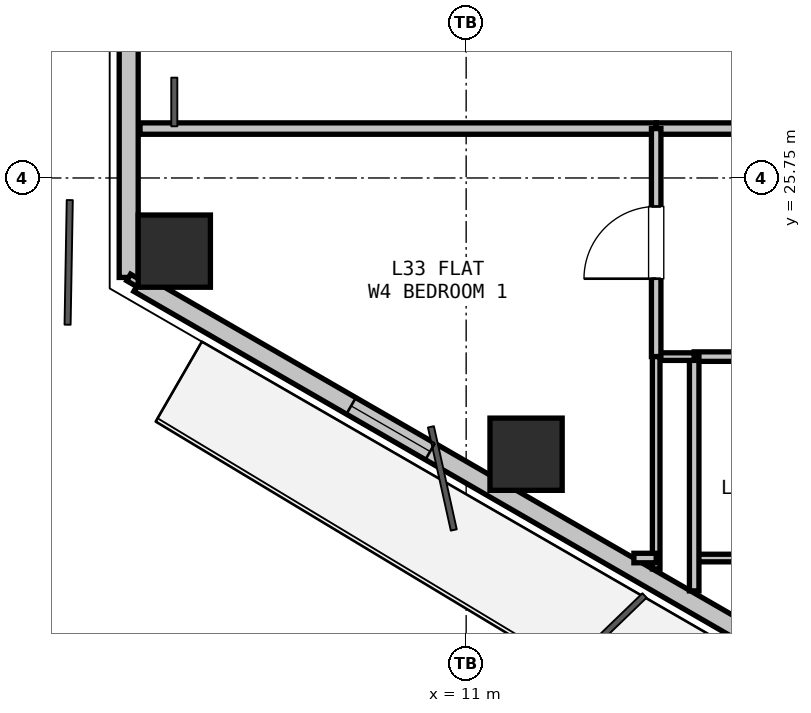
"""IFC4 building model, lengths in metres.
Left out: names, types, materials, properties, quantities, classifications, styles, units other than length and angle.
Written with IfcOpenShell. Run it as: python <this file> out.ifc"""

import sys

from ifc_helpers import new_model, si_unit, direction, frame, frame_2d, origin, origin_2d, place, context, subcontext, project, spatial, rectangle, hollow_rectangle, extrude, element, fill, save


model = new_model("IFC4")
c1 = context("Model", 3, precision=1e-05, world=origin(), true_north=direction((0.0, 1.0)))
c2 = subcontext(c1, "Body", "Model", "MODEL_VIEW")
j1 = project(units=[si_unit("LENGTHUNIT", "METRE"), si_unit("PLANEANGLEUNIT", "RADIAN")], contexts=[c1])
p1 = place(None, origin())
s1 = spatial("IfcSite", under=j1, at=p1, CompositionType="ELEMENT")
p2 = place(p1, origin())
s2 = spatial("IfcBuilding", under=s1, at=p2, CompositionType="ELEMENT")
p3 = place(p2, frame((0.0, 0.0, 121.2)))
s3 = spatial("IfcBuildingStorey", under=s2, at=p3, CompositionType="ELEMENT", Elevation=121.2)
for number, where, z_axis, x_axis in (
    (1, (11.788, 22.116, -0.24), (0.0, 0.0, 1.0), (1.0, 0.0, 0.0)),
    (2, (7.16, 24.788, -0.24), (0.0, 0.0, 1.0), (1.0, 0.0, 0.0)),
):
    element("IfcColumn", number, at=place(p3, frame(where, z_axis=z_axis, x_axis=x_axis)), inside=s3, PredefinedType="COLUMN", context=c2, shape_type="SweptSolid", body=[
        extrude(hollow_rectangle(XDim=0.95, YDim=0.95, WallThickness=0.028, at=origin_2d()), origin(), (0.0, 0.0, 1.0), 3.54),
    ])
p4 = place(p3, frame((6.56, 24.441, 0.0), z_axis=(0.0, 0.0, 1.0), x_axis=(0.0, 1.0, 0.0)))
e3 = element("IfcWall", 3, at=p4, inside=s3, PredefinedType="SOLIDWALL", context=c2, shape_type="SweptSolid", body=[
    extrude(rectangle(XDim=4.617, YDim=0.25, at=frame_2d((2.309, 0.0))), origin(), (0.0, 0.0, 1.0), 2.68),
])
p5 = place(p3, frame((16.378, 18.773, 0.0), z_axis=(0.0, 0.0, 1.0), x_axis=(-0.866027848477, 0.499995765644, 0.0)))
e4 = element("IfcWall", 4, at=p5, inside=s3, PredefinedType="SOLIDWALL", context=c2, shape_type="SweptSolid", body=[
    extrude(rectangle(XDim=11.186, YDim=0.25, at=frame_2d((5.593, 0.0))), origin(), (0.0, 0.0, 1.0), 2.68),
])
p6 = place(p5, frame((6.757, 0.0, 0.9)))
e5 = element("IfcOpeningElement", 5, at=p6, cuts=e4, PredefinedType="OPENING", context=c2, shape_type="SweptSolid", body=[
    extrude(rectangle(XDim=1.2, YDim=1.4, at=frame_2d((0.6, 0.7))), frame((0.0, 0.135, 0.0), z_axis=(0.0, -1.0, 0.0), x_axis=(1.0, 0.0, 0.0)), (0.0, 0.0, 1.0), 0.27),
])
p7 = place(p3, frame((14.0, 23.4, 0.0), z_axis=(0.0, 0.0, 1.0), x_axis=(1.0, 0.0, 0.0)))
e6 = element("IfcWall", 6, at=p7, inside=s3, PredefinedType="PARTITIONING", context=c2, shape_type="SweptSolid", body=[
    extrude(rectangle(XDim=3.0, YDim=0.125, at=frame_2d((1.5, 0.0))), origin(), (0.0, 0.0, 1.0), 3.06),
])
p8 = place(p7, frame((1.025, 0.0, 0.0)))
e7 = element("IfcOpeningElement", 7, at=p8, cuts=e6, PredefinedType="OPENING", context=c2, shape_type="SweptSolid", body=[
    extrude(rectangle(XDim=0.95, YDim=2.1, at=frame_2d((0.475, 1.05))), frame((0.0, 0.073, 0.0), z_axis=(0.0, -1.0, 0.0), x_axis=(1.0, 0.0, 0.0)), (0.0, 0.0, 1.0), 0.145),
])
p9 = place(p3, frame((17.0, 20.75, 0.0), z_axis=(0.0, 0.0, 1.0), x_axis=(-1.0, 0.0, 0.0)))
e8 = element("IfcWall", 8, at=p9, inside=s3, PredefinedType="PARTITIONING", context=c2, shape_type="SweptSolid", body=[
    extrude(rectangle(XDim=3.0, YDim=0.1, at=frame_2d((1.5, 0.0))), origin(), (0.0, 0.0, 1.0), 2.365),
])
p10 = place(p3, frame((14.0, 20.318, 0.0), z_axis=(0.0, 0.0, 1.0), x_axis=(0.0, 1.0, 0.0)))
e9 = element("IfcWall", 9, at=p10, inside=s3, PredefinedType="PARTITIONING", context=c2, shape_type="SweptSolid", body=[
    extrude(rectangle(XDim=3.082, YDim=0.125, at=frame_2d((1.541, 0.0))), origin(), (0.0, 0.0, 1.0), 2.365),
])
p11 = place(p3, frame((21.95, 26.4, 0.0), z_axis=(0.0, 0.0, 1.0), x_axis=(-1.0, 0.0, 0.0)))
e10 = element("IfcWall", 10, at=p11, inside=s3, PredefinedType="PARTITIONING", context=c2, shape_type="SweptSolid", body=[
    extrude(rectangle(XDim=8.45, YDim=0.15, at=frame_2d((4.225, 0.0))), origin(), (0.0, 0.0, 1.0), 2.508),
])
p12 = place(p3, frame((13.5, 26.4, 0.0), z_axis=(0.0, 0.0, 1.0), x_axis=(-1.0, 0.0, 0.0)))
e11 = element("IfcWall", 11, at=p12, inside=s3, PredefinedType="PARTITIONING", context=c2, shape_type="SweptSolid", body=[
    extrude(rectangle(XDim=6.791, YDim=0.15, at=frame_2d((3.396, 0.0))), origin(), (0.0, 0.0, 1.0), 2.725),
])
p13 = place(p3, frame((14.0, 23.4, 0.0), z_axis=(0.0, 0.0, 1.0), x_axis=(-1.0, 0.0, 0.0)))
e12 = element("IfcWall", 12, at=p13, inside=s3, PredefinedType="PARTITIONING", context=c2, shape_type="SweptSolid", body=[
    extrude(rectangle(XDim=0.5, YDim=0.1, at=frame_2d((0.25, 0.0))), origin(), (0.0, 0.0, 1.0), 3.06),
])
p14 = place(p3, frame((13.5, 23.4, 0.0), z_axis=(0.0, 0.0, 1.0), x_axis=(0.0, 1.0, 0.0)))
e13 = element("IfcWall", 13, at=p14, inside=s3, PredefinedType="PARTITIONING", context=c2, shape_type="SweptSolid", body=[
    extrude(rectangle(XDim=3.0, YDim=0.125, at=frame_2d((1.5, 0.0))), origin(), (0.0, 0.0, 1.0), 3.06),
])
p15 = place(p14, frame((1.025, 0.0, 0.0)))
e14 = element("IfcOpeningElement", 14, at=p15, cuts=e13, PredefinedType="OPENING", context=c2, shape_type="SweptSolid", body=[
    extrude(rectangle(XDim=0.95, YDim=2.1, at=frame_2d((0.475, 1.05))), frame((0.0, 0.073, 0.0), z_axis=(0.0, -1.0, 0.0), x_axis=(1.0, 0.0, 0.0)), (0.0, 0.0, 1.0), 0.145),
])
p16 = place(p3, frame((13.5, 23.4, 0.0), z_axis=(0.0, 0.0, 1.0), x_axis=(0.0, -1.0, 0.0)))
e15 = element("IfcWall", 15, at=p16, inside=s3, PredefinedType="PARTITIONING", context=c2, shape_type="SweptSolid", body=[
    extrude(rectangle(XDim=2.793, YDim=0.1, at=frame_2d((1.396, 0.0))), origin(), (0.0, 0.0, 1.0), 2.365),
])
p17 = place(p3, frame((13.5, 20.75, 0.0), z_axis=(0.0, 0.0, 1.0), x_axis=(-1.0, 0.0, 0.0)))
e16 = element("IfcWall", 16, at=p17, inside=s3, PredefinedType="PARTITIONING", context=c2, shape_type="SweptSolid", body=[
    extrude(rectangle(XDim=0.293, YDim=0.125, at=frame_2d((0.146, 0.0))), origin(), (0.0, 0.0, 1.0), 3.06),
])
p18 = place(p3, frame((6.69, 24.366, 0.0), z_axis=(0.0, 0.0, 1.0), x_axis=(-0.866131372301, 0.499816412211, 0.0)))
e17 = element("IfcWall", 17, at=p18, inside=s3, PredefinedType="PARTITIONING", context=c2, shape_type="SweptSolid", body=[
    extrude(rectangle(XDim=0.15, YDim=0.1, at=frame_2d((0.075, 0.0))), origin(), (0.0, 0.0, 1.0), 3.06),
])
p19 = place(p6, origin())
e18 = element("IfcWindow", 18, at=p19, inside=s3, PartitioningType="SINGLE_PANEL", PredefinedType="WINDOW", context=c2, shape_type="SweptSolid", body=[
    extrude(rectangle(XDim=1.2, YDim=1.4, at=frame_2d((0.6, 0.7))), frame((0.0, 0.03, 0.0), z_axis=(0.0, -1.0, 0.0), x_axis=(1.0, 0.0, 0.0)), (0.0, 0.0, 1.0), 0.06),
])
fill(e5, e18)
p20 = place(p15, origin())
e19 = element("IfcDoor", 19, at=p20, inside=s3, OperationType="SINGLE_SWING_LEFT", PredefinedType="DOOR", context=c2, shape_type="SweptSolid", body=[
    extrude(rectangle(XDim=0.95, YDim=2.1, at=frame_2d((0.475, 1.05))), frame((0.0, 0.025, 0.0), z_axis=(0.0, -1.0, 0.0), x_axis=(1.0, 0.0, 0.0)), (0.0, 0.0, 1.0), 0.05),
])
fill(e14, e19)
save(model, sys.argv[1])
